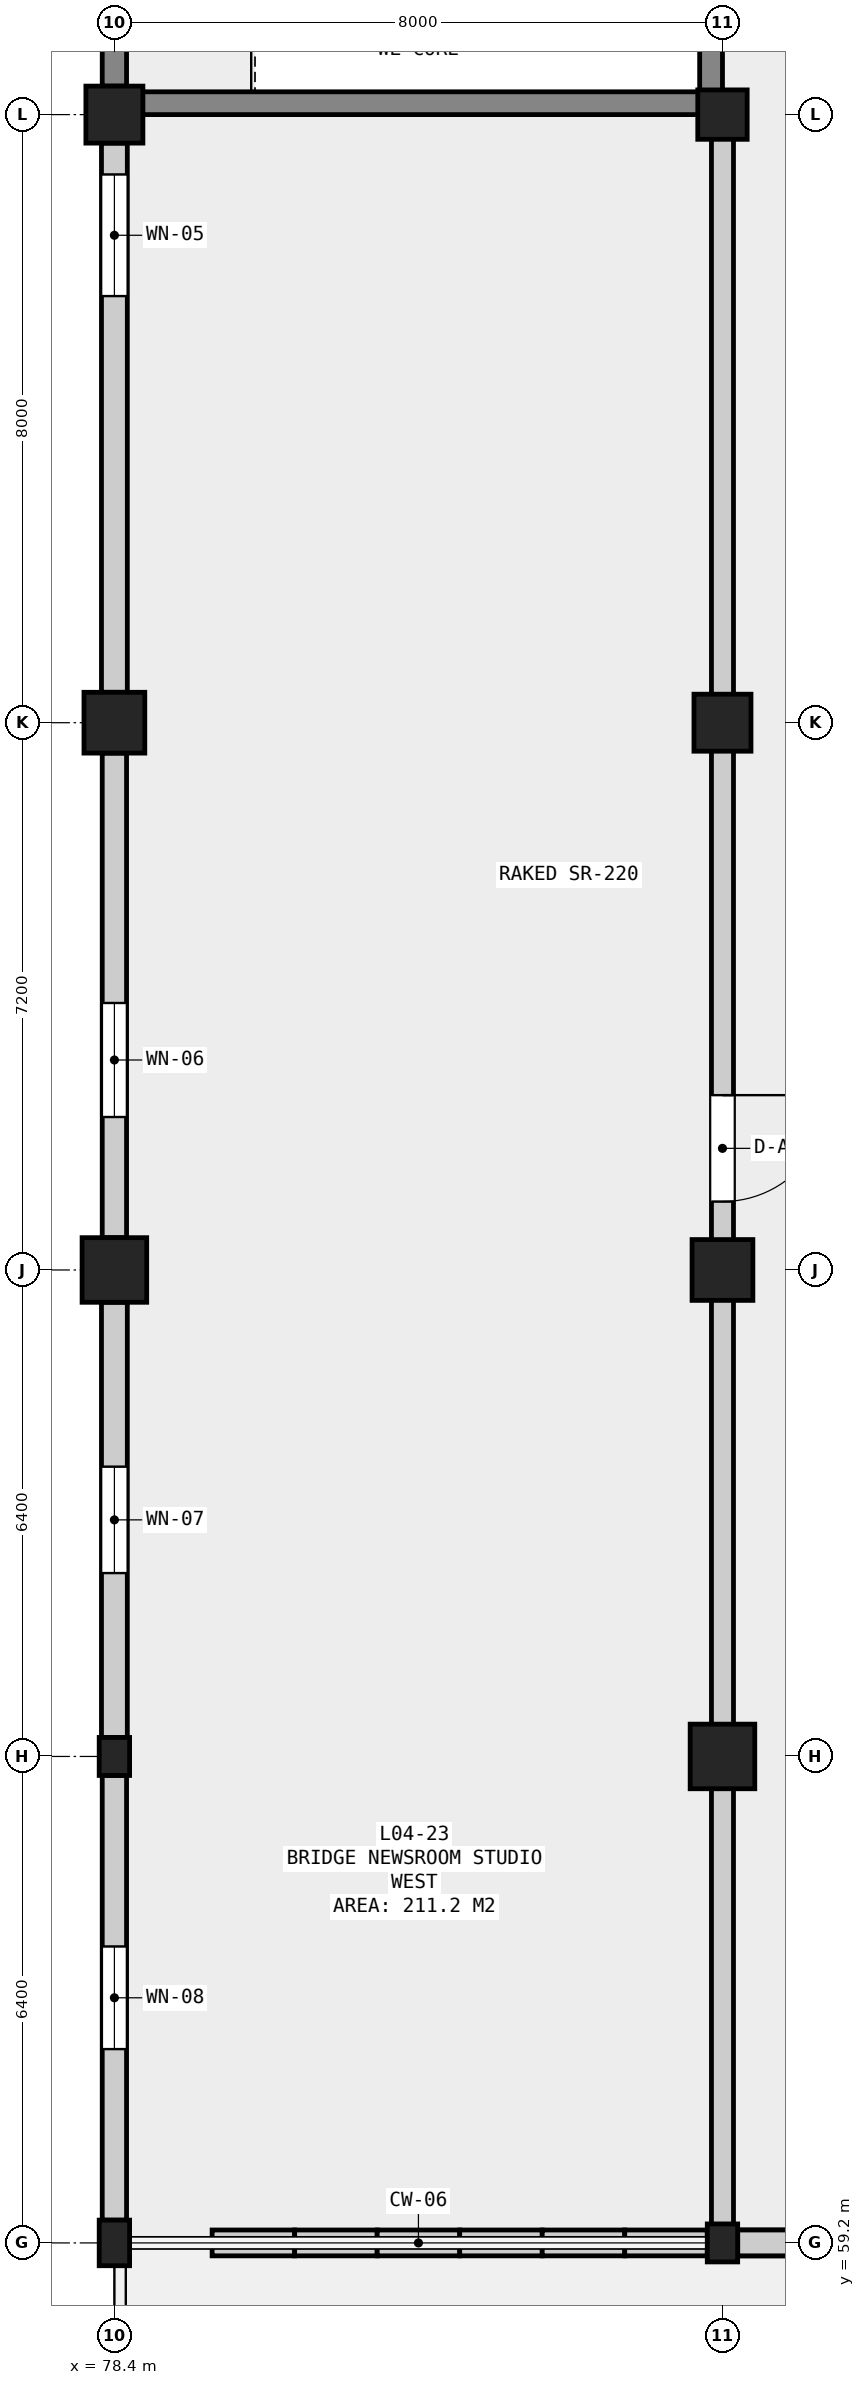
"""IFC4 building model, lengths in metres.
Left out: names, types, materials, properties, quantities, classifications, styles, units other than length and angle.
Written with IfcOpenShell. Run it as: python <this file> out.ifc"""

import sys

from ifc_helpers import new_model, si_unit, direction, frame, frame_2d, origin, origin_2d, place, context, subcontext, project, spatial, rectangle, extrude, element, fill, save


model = new_model("IFC4")
c1 = context("Model", 3, precision=1e-05, world=origin(), true_north=direction((0.0, 1.0)))
c2 = subcontext(c1, "Body", "Model", "MODEL_VIEW")
j1 = project(units=[si_unit("LENGTHUNIT", "METRE"), si_unit("PLANEANGLEUNIT", "RADIAN")], contexts=[c1])
p1 = place(None, origin())
s1 = spatial("IfcSite", under=j1, at=p1, CompositionType="ELEMENT")
p2 = place(p1, origin())
s2 = spatial("IfcBuilding", under=s1, at=p2, CompositionType="ELEMENT")
p3 = place(p2, frame((0.0, 0.0, 19.8)))
s3 = spatial("IfcBuildingStorey", under=s2, at=p3, CompositionType="ELEMENT", Elevation=19.8)
p4 = place(p3, frame((78.4, 59.2, 0.0), z_axis=(0.0, 0.0, 1.0), x_axis=(1.0, 0.0, 0.0)))
e1 = element("IfcColumn", 1, at=p4, inside=s3, PredefinedType="COLUMN", context=c2, shape_type="SweptSolid", body=[
    extrude(rectangle(XDim=0.4, YDim=0.6, at=origin_2d()), origin(), (0.0, 0.0, 1.0), 4.0),
])
p5 = place(p3, frame((78.4, 65.6, 0.0), z_axis=(0.0, 0.0, 1.0), x_axis=(1.0, 0.0, 0.0)))
e2 = element("IfcColumn", 2, at=p5, inside=s3, PredefinedType="COLUMN", context=c2, shape_type="SweptSolid", body=[
    extrude(rectangle(XDim=0.4, YDim=0.5, at=origin_2d()), origin(), (0.0, 0.0, 1.0), 4.0),
])
p6 = place(p3, frame((78.4, 72.0, 0.0), z_axis=(0.0, 0.0, 1.0), x_axis=(1.0, 0.0, 0.0)))
e3 = element("IfcColumn", 3, at=p6, inside=s3, PredefinedType="COLUMN", context=c2, shape_type="SweptSolid", body=[
    extrude(rectangle(XDim=0.85, YDim=0.85, at=origin_2d()), origin(), (0.0, 0.0, 1.0), 4.0),
])
p7 = place(p3, frame((78.4, 79.2, 0.0), z_axis=(0.0, 0.0, 1.0), x_axis=(1.0, 0.0, 0.0)))
e4 = element("IfcColumn", 4, at=p7, inside=s3, PredefinedType="COLUMN", context=c2, shape_type="SweptSolid", body=[
    extrude(rectangle(XDim=0.8, YDim=0.8, at=origin_2d()), origin(), (0.0, 0.0, 1.0), 4.0),
])
p8 = place(p3, frame((78.4, 87.2, 0.0), z_axis=(0.0, 0.0, 1.0), x_axis=(1.0, 0.0, 0.0)))
e5 = element("IfcColumn", 5, at=p8, inside=s3, PredefinedType="COLUMN", context=c2, shape_type="SweptSolid", body=[
    extrude(rectangle(XDim=0.75, YDim=0.75, at=origin_2d()), origin(), (0.0, 0.0, 1.0), 4.0),
])
p9 = place(p3, frame((86.4, 59.2, 0.0), z_axis=(0.0, 0.0, 1.0), x_axis=(1.0, 0.0, 0.0)))
e6 = element("IfcColumn", 6, at=p9, inside=s3, PredefinedType="COLUMN", context=c2, shape_type="SweptSolid", body=[
    extrude(rectangle(XDim=0.4, YDim=0.5, at=origin_2d()), origin(), (0.0, 0.0, 1.0), 4.0),
])
p10 = place(p3, frame((86.4, 65.6, 0.0), z_axis=(0.0, 0.0, 1.0), x_axis=(1.0, 0.0, 0.0)))
e7 = element("IfcColumn", 7, at=p10, inside=s3, PredefinedType="COLUMN", context=c2, shape_type="SweptSolid", body=[
    extrude(rectangle(XDim=0.85, YDim=0.85, at=origin_2d()), origin(), (0.0, 0.0, 1.0), 4.0),
])
p11 = place(p3, frame((86.4, 72.0, 0.0), z_axis=(0.0, 0.0, 1.0), x_axis=(1.0, 0.0, 0.0)))
e8 = element("IfcColumn", 8, at=p11, inside=s3, PredefinedType="COLUMN", context=c2, shape_type="SweptSolid", body=[
    extrude(rectangle(XDim=0.8, YDim=0.8, at=origin_2d()), origin(), (0.0, 0.0, 1.0), 4.0),
])
p12 = place(p3, frame((86.4, 79.2, 0.0), z_axis=(0.0, 0.0, 1.0), x_axis=(1.0, 0.0, 0.0)))
e9 = element("IfcColumn", 9, at=p12, inside=s3, PredefinedType="COLUMN", context=c2, shape_type="SweptSolid", body=[
    extrude(rectangle(XDim=0.75, YDim=0.75, at=origin_2d()), origin(), (0.0, 0.0, 1.0), 4.0),
])
p13 = place(p3, frame((86.4, 87.2, 0.0), z_axis=(0.0, 0.0, 1.0), x_axis=(1.0, 0.0, 0.0)))
e10 = element("IfcColumn", 10, at=p13, inside=s3, PredefinedType="COLUMN", context=c2, shape_type="SweptSolid", body=[
    extrude(rectangle(XDim=0.65, YDim=0.65, at=origin_2d()), origin(), (0.0, 0.0, 1.0), 4.0),
])
p14 = place(p3, frame((86.6, 59.2, 0.0), z_axis=(0.0, 0.0, 1.0), x_axis=(1.0, 0.0, 0.0)))
e11 = element("IfcWall", 11, at=p14, inside=s3, PredefinedType="SOLIDWALL", context=c2, shape_type="SweptSolid", body=[
    extrude(rectangle(XDim=15.4, YDim=0.34, at=frame_2d((7.7, 0.0))), origin(), (0.0, 0.0, 1.0), 2.89),
])
p15 = place(p14, frame((4.05, 0.0, 0.0)))
e12 = element("IfcOpeningElement", 12, at=p15, cuts=e11, PredefinedType="OPENING", context=c2, shape_type="SweptSolid", body=[
    extrude(rectangle(XDim=1.5, YDim=2.2, at=frame_2d((0.75, 1.1))), frame((0.0, 0.182, 0.0), z_axis=(0.0, -1.0, 0.0), x_axis=(1.0, 0.0, 0.0)), (0.0, 0.0, 1.0), 0.364),
])
p16 = place(p3, frame((78.4, 94.875, 0.0), z_axis=(0.0, 0.0, 1.0), x_axis=(0.0, -1.0, 0.0)))
e13 = element("IfcWall", 13, at=p16, inside=s3, PredefinedType="SOLIDWALL", context=c2, shape_type="SweptSolid", body=[
    extrude(rectangle(XDim=7.3, YDim=0.32, at=frame_2d((3.65, 0.0))), origin(), (0.0, 0.0, 1.0), 3.15),
])
p17 = place(p16, frame((1.1, 0.0, 0.9)))
e14 = element("IfcOpeningElement", 14, at=p17, cuts=e13, PredefinedType="OPENING", context=c2, shape_type="SweptSolid", body=[
    extrude(rectangle(XDim=1.8, YDim=1.85, at=frame_2d((0.9, 0.925))), frame((0.0, 0.172, 0.0), z_axis=(0.0, -1.0, 0.0), x_axis=(1.0, 0.0, 0.0)), (0.0, 0.0, 1.0), 0.344),
])
p18 = place(p3, frame((78.4, 86.825, 0.0), z_axis=(0.0, 0.0, 1.0), x_axis=(0.0, -1.0, 0.0)))
e15 = element("IfcWall", 15, at=p18, inside=s3, PredefinedType="SOLIDWALL", context=c2, shape_type="SweptSolid", body=[
    extrude(rectangle(XDim=7.225, YDim=0.34, at=frame_2d((3.612, 0.0))), origin(), (0.0, 0.0, 1.0), 3.1),
])
p19 = place(p18, frame((0.413, 0.0, 0.9)))
e16 = element("IfcOpeningElement", 16, at=p19, cuts=e15, PredefinedType="OPENING", context=c2, shape_type="SweptSolid", body=[
    extrude(rectangle(XDim=1.6, YDim=1.95, at=frame_2d((0.8, 0.975))), frame((0.0, 0.182, 0.0), z_axis=(0.0, -1.0, 0.0), x_axis=(1.0, 0.0, 0.0)), (0.0, 0.0, 1.0), 0.364),
])
p20 = place(p3, frame((78.4, 78.8, 0.0), z_axis=(0.0, 0.0, 1.0), x_axis=(0.0, -1.0, 0.0)))
e17 = element("IfcWall", 17, at=p20, inside=s3, PredefinedType="SOLIDWALL", context=c2, shape_type="SweptSolid", body=[
    extrude(rectangle(XDim=6.375, YDim=0.32, at=frame_2d((3.188, 0.0))), origin(), (0.0, 0.0, 1.0), 3.1),
])
p21 = place(p20, frame((3.288, 0.0, 0.9)))
e18 = element("IfcOpeningElement", 18, at=p21, cuts=e17, PredefinedType="OPENING", context=c2, shape_type="SweptSolid", body=[
    extrude(rectangle(XDim=1.5, YDim=1.85, at=frame_2d((0.75, 0.925))), frame((0.0, 0.172, 0.0), z_axis=(0.0, -1.0, 0.0), x_axis=(1.0, 0.0, 0.0)), (0.0, 0.0, 1.0), 0.344),
])
p22 = place(p3, frame((78.4, 71.575, 0.0), z_axis=(0.0, 0.0, 1.0), x_axis=(0.0, -1.0, 0.0)))
e19 = element("IfcWall", 19, at=p22, inside=s3, PredefinedType="SOLIDWALL", context=c2, shape_type="SweptSolid", body=[
    extrude(rectangle(XDim=5.725, YDim=0.34, at=frame_2d((2.862, 0.0))), origin(), (0.0, 0.0, 1.0), 3.1),
])
p23 = place(p22, frame((2.163, 0.0, 0.9)))
e20 = element("IfcOpeningElement", 20, at=p23, cuts=e19, PredefinedType="OPENING", context=c2, shape_type="SweptSolid", body=[
    extrude(rectangle(XDim=1.4, YDim=1.8, at=frame_2d((0.7, 0.9))), frame((0.0, 0.182, 0.0), z_axis=(0.0, -1.0, 0.0), x_axis=(1.0, 0.0, 0.0)), (0.0, 0.0, 1.0), 0.364),
])
p24 = place(p3, frame((78.4, 65.35, 0.0), z_axis=(0.0, 0.0, 1.0), x_axis=(0.0, -1.0, 0.0)))
e21 = element("IfcWall", 21, at=p24, inside=s3, PredefinedType="SOLIDWALL", context=c2, shape_type="SweptSolid", body=[
    extrude(rectangle(XDim=5.85, YDim=0.32, at=frame_2d((2.925, 0.0))), origin(), (0.0, 0.0, 1.0), 3.1),
])
p25 = place(p24, frame((2.25, 0.0, 0.9)))
e22 = element("IfcOpeningElement", 22, at=p25, cuts=e21, PredefinedType="OPENING", context=c2, shape_type="SweptSolid", body=[
    extrude(rectangle(XDim=1.35, YDim=1.75, at=frame_2d((0.675, 0.875))), frame((0.0, 0.172, 0.0), z_axis=(0.0, -1.0, 0.0), x_axis=(1.0, 0.0, 0.0)), (0.0, 0.0, 1.0), 0.344),
])
p26 = place(p3, frame((79.686, 59.2, 4.0), z_axis=(0.0, 0.0, 1.0), x_axis=(1.0, 0.0, 0.0)))
e23 = element("IfcWall", 23, at=p26, inside=s3, PredefinedType="SOLIDWALL", context=c2, shape_type="SweptSolid", body=[
    extrude(rectangle(XDim=1.086, YDim=0.34, at=frame_2d((0.543, 0.0))), origin(), (0.0, 0.0, 1.0), 0.321),
])
p27 = place(p3, frame((80.771, 59.2, 4.0), z_axis=(0.0, 0.0, 1.0), x_axis=(1.0, 0.0, 0.0)))
e24 = element("IfcWall", 24, at=p27, inside=s3, PredefinedType="SOLIDWALL", context=c2, shape_type="SweptSolid", body=[
    extrude(rectangle(XDim=1.086, YDim=0.34, at=frame_2d((0.543, 0.0))), origin(), (0.0, 0.0, 1.0), 0.591),
])
p28 = place(p3, frame((81.857, 59.2, 4.0), z_axis=(0.0, 0.0, 1.0), x_axis=(1.0, 0.0, 0.0)))
e25 = element("IfcWall", 25, at=p28, inside=s3, PredefinedType="SOLIDWALL", context=c2, shape_type="SweptSolid", body=[
    extrude(rectangle(XDim=1.086, YDim=0.34, at=frame_2d((0.543, 0.0))), origin(), (0.0, 0.0, 1.0), 0.862),
])
p29 = place(p3, frame((82.943, 59.2, 4.0), z_axis=(0.0, 0.0, 1.0), x_axis=(1.0, 0.0, 0.0)))
e26 = element("IfcWall", 26, at=p29, inside=s3, PredefinedType="SOLIDWALL", context=c2, shape_type="SweptSolid", body=[
    extrude(rectangle(XDim=1.086, YDim=0.34, at=frame_2d((0.543, 0.0))), origin(), (0.0, 0.0, 1.0), 1.133),
])
p30 = place(p3, frame((84.029, 59.2, 4.0), z_axis=(0.0, 0.0, 1.0), x_axis=(1.0, 0.0, 0.0)))
e27 = element("IfcWall", 27, at=p30, inside=s3, PredefinedType="SOLIDWALL", context=c2, shape_type="SweptSolid", body=[
    extrude(rectangle(XDim=1.086, YDim=0.34, at=frame_2d((0.543, 0.0))), origin(), (0.0, 0.0, 1.0), 1.403),
])
p31 = place(p3, frame((85.114, 59.2, 4.0), z_axis=(0.0, 0.0, 1.0), x_axis=(1.0, 0.0, 0.0)))
e28 = element("IfcWall", 28, at=p31, inside=s3, PredefinedType="SOLIDWALL", context=c2, shape_type="SweptSolid", body=[
    extrude(rectangle(XDim=1.086, YDim=0.34, at=frame_2d((0.543, 0.0))), origin(), (0.0, 0.0, 1.0), 1.674),
])
p32 = place(p3, frame((86.6, 59.2, 4.0), z_axis=(0.0, 0.0, 1.0), x_axis=(1.0, 0.0, 0.0)))
e29 = element("IfcWall", 29, at=p32, inside=s3, PredefinedType="SOLIDWALL", context=c2, shape_type="SweptSolid", body=[
    extrude(rectangle(XDim=1.711, YDim=0.34, at=frame_2d((0.855, 0.0))), origin(), (0.0, 0.0, 1.0), 2.044),
])
p33 = place(p3, frame((86.25, 87.2, 0.0), z_axis=(0.0, 0.0, 1.0), x_axis=(0.0, 1.0, 0.0)))
e30 = element("IfcWall", 30, at=p33, inside=s3, PredefinedType="SHEAR", context=c2, shape_type="SweptSolid", body=[
    extrude(rectangle(XDim=4.2, YDim=0.3, at=frame_2d((2.1, 0.0))), origin(), (0.0, 0.0, 1.0), 3.72),
])
p34 = place(p3, frame((78.7, 87.35, 0.0), z_axis=(0.0, 0.0, 1.0), x_axis=(1.0, 0.0, 0.0)))
e31 = element("IfcWall", 31, at=p34, inside=s3, PredefinedType="SHEAR", context=c2, shape_type="SweptSolid", body=[
    extrude(rectangle(XDim=7.4, YDim=0.3, at=frame_2d((3.7, 0.0))), origin(), (0.0, 0.0, 1.0), 3.72),
])
p35 = place(p3, frame((86.4, 59.385, 0.0), z_axis=(0.0, 0.0, 1.0), x_axis=(0.0, 1.0, 0.0)))
e32 = element("IfcWall", 32, at=p35, inside=s3, PredefinedType="SOLIDWALL", context=c2, shape_type="SweptSolid", body=[
    extrude(rectangle(XDim=27.675, YDim=0.29, at=frame_2d((13.837, 0.0))), origin(), (0.0, 0.0, 1.0), 3.72),
])
p36 = place(p35, frame((13.515, 0.0, 0.0)))
e33 = element("IfcOpeningElement", 33, at=p36, cuts=e32, PredefinedType="OPENING", context=c2, shape_type="SweptSolid", body=[
    extrude(rectangle(XDim=1.4, YDim=2.2, at=frame_2d((0.7, 1.1))), frame((0.0, 0.157, 0.0), z_axis=(0.0, -1.0, 0.0), x_axis=(1.0, 0.0, 0.0)), (0.0, 0.0, 1.0), 0.314),
])
p37 = place(p19, origin())
e34 = element("IfcWindow", 34, at=p37, inside=s3, PartitioningType="DOUBLE_PANEL_VERTICAL", PredefinedType="WINDOW", context=c2, shape_type="SweptSolid", body=[
    extrude(rectangle(XDim=1.6, YDim=1.95, at=frame_2d((0.8, 0.975))), frame((0.0, 0.03, 0.0), z_axis=(0.0, -1.0, 0.0), x_axis=(1.0, 0.0, 0.0)), (0.0, 0.0, 1.0), 0.06),
])
fill(e16, e34)
p38 = place(p21, origin())
e35 = element("IfcWindow", 35, at=p38, inside=s3, PartitioningType="SINGLE_PANEL", PredefinedType="WINDOW", context=c2, shape_type="SweptSolid", body=[
    extrude(rectangle(XDim=1.5, YDim=1.85, at=frame_2d((0.75, 0.925))), frame((0.0, 0.03, 0.0), z_axis=(0.0, -1.0, 0.0), x_axis=(1.0, 0.0, 0.0)), (0.0, 0.0, 1.0), 0.06),
])
fill(e18, e35)
p39 = place(p23, origin())
e36 = element("IfcWindow", 36, at=p39, inside=s3, PartitioningType="SINGLE_PANEL", PredefinedType="WINDOW", context=c2, shape_type="SweptSolid", body=[
    extrude(rectangle(XDim=1.4, YDim=1.8, at=frame_2d((0.7, 0.9))), frame((0.0, 0.03, 0.0), z_axis=(0.0, -1.0, 0.0), x_axis=(1.0, 0.0, 0.0)), (0.0, 0.0, 1.0), 0.06),
])
fill(e20, e36)
p40 = place(p25, origin())
e37 = element("IfcWindow", 37, at=p40, inside=s3, PartitioningType="SINGLE_PANEL", PredefinedType="WINDOW", context=c2, shape_type="SweptSolid", body=[
    extrude(rectangle(XDim=1.35, YDim=1.75, at=frame_2d((0.675, 0.875))), frame((0.0, 0.03, 0.0), z_axis=(0.0, -1.0, 0.0), x_axis=(1.0, 0.0, 0.0)), (0.0, 0.0, 1.0), 0.06),
])
fill(e22, e37)
p41 = place(p36, frame((1.4, 0.0, 0.0), z_axis=(0.0, 0.0, 1.0), x_axis=(-1.0, 0.0, 0.0)))
e38 = element("IfcDoor", 38, at=p41, inside=s3, OperationType="SINGLE_SWING_LEFT", PredefinedType="DOOR", context=c2, shape_type="SweptSolid", body=[
    extrude(rectangle(XDim=1.4, YDim=2.2, at=frame_2d((0.7, 1.1))), frame((0.0, 0.025, 0.0), z_axis=(0.0, -1.0, 0.0), x_axis=(1.0, 0.0, 0.0)), (0.0, 0.0, 1.0), 0.05),
])
fill(e33, e38)
save(model, sys.argv[1])
